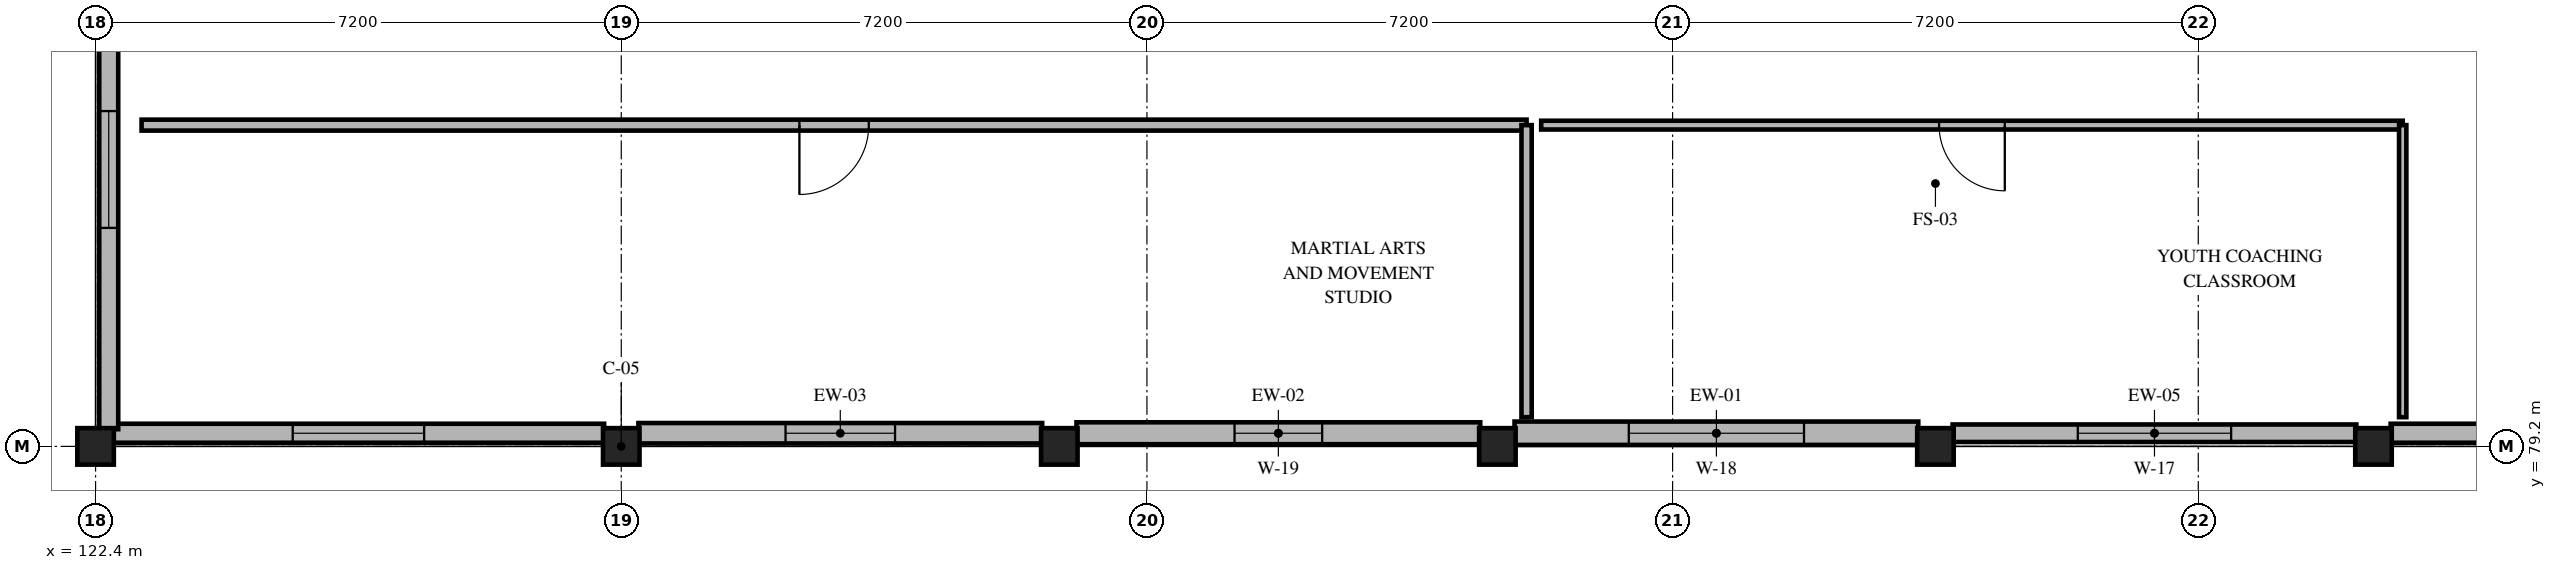
"""IFC4 building model, lengths in metres.
Left out: names, types, materials, properties, quantities, classifications, styles, units other than length and angle.
Written with IfcOpenShell. Run it as: python <this file> out.ifc"""

import sys

from ifc_helpers import new_model, si_unit, direction, frame, frame_2d, origin, origin_2d, place, context, subcontext, project, spatial, rectangle, extrude, element, fill, save


model = new_model("IFC4")
c1 = context("Model", 3, precision=1e-05, world=origin(), true_north=direction((0.0, 1.0)))
c2 = subcontext(c1, "Body", "Model", "MODEL_VIEW")
j1 = project(units=[si_unit("LENGTHUNIT", "METRE"), si_unit("PLANEANGLEUNIT", "RADIAN")], contexts=[c1])
p1 = place(None, origin())
s1 = spatial("IfcSite", under=j1, at=p1, CompositionType="ELEMENT")
p2 = place(p1, origin())
s2 = spatial("IfcBuilding", under=s1, at=p2, CompositionType="ELEMENT")
p3 = place(p2, frame((0.0, 0.0, 8.7)))
s3 = spatial("IfcBuildingStorey", under=s2, at=p3, CompositionType="ELEMENT", Elevation=8.7)
for number, where, z_axis, x_axis in (
    (1, (129.6, 79.2, 0.0), (0.0, 0.0, 1.0), (1.0, 0.0, 0.0)),
    (2, (135.6, 79.2, 0.0), (0.0, 0.0, 1.0), (1.0, 0.0, 0.0)),
    (3, (141.6, 79.2, 0.0), (0.0, 0.0, 1.0), (1.0, 0.0, 0.0)),
    (4, (147.6, 79.2, 0.0), (0.0, 0.0, 1.0), (1.0, 0.0, 0.0)),
    (5, (153.6, 79.2, 0.0), (0.0, 0.0, 1.0), (1.0, 0.0, 0.0)),
    (6, (122.4, 79.2, 0.0), (0.0, 0.0, 1.0), (1.0, 0.0, 0.0)),
):
    element("IfcColumn", number, at=place(p3, frame(where, z_axis=z_axis, x_axis=x_axis)), inside=s3, PredefinedType="COLUMN", context=c2, shape_type="SweptSolid", body=[
        extrude(rectangle(XDim=0.5, YDim=0.5, at=origin_2d()), origin(), (0.0, 0.0, 1.0), 4.2),
    ])
p4 = place(p3, frame((159.365, 79.38, 0.0), z_axis=(0.0, 0.0, 1.0), x_axis=(-1.0, 0.0, 0.0)))
e7 = element("IfcWall", 7, at=p4, inside=s3, PredefinedType="SOLIDWALL", context=c2, shape_type="SweptSolid", body=[
    extrude(rectangle(XDim=5.53, YDim=0.26, at=frame_2d((2.765, 0.0))), origin(), (0.0, 0.0, 1.0), 3.6),
])
p5 = place(p4, frame((1.865, 0.0, 0.75)))
e8 = element("IfcOpeningElement", 8, at=p5, cuts=e7, PredefinedType="OPENING", context=c2, shape_type="SweptSolid", body=[
    extrude(rectangle(XDim=1.8, YDim=1.5, at=frame_2d((0.9, 0.75))), frame((0.0, 0.14, 0.0), z_axis=(0.0, -1.0, 0.0), x_axis=(1.0, 0.0, 0.0)), (0.0, 0.0, 1.0), 0.28),
])
p6 = place(p3, frame((153.365, 79.38, 0.0), z_axis=(0.0, 0.0, 1.0), x_axis=(-1.0, 0.0, 0.0)))
e9 = element("IfcWall", 9, at=p6, inside=s3, PredefinedType="SOLIDWALL", context=c2, shape_type="SweptSolid", body=[
    extrude(rectangle(XDim=5.53, YDim=0.24, at=frame_2d((2.765, 0.0))), origin(), (0.0, 0.0, 1.0), 3.6),
])
p7 = place(p6, frame((1.715, 0.0, 0.75)))
e10 = element("IfcOpeningElement", 10, at=p7, cuts=e9, PredefinedType="OPENING", context=c2, shape_type="SweptSolid", body=[
    extrude(rectangle(XDim=2.1, YDim=1.5, at=frame_2d((1.05, 0.75))), frame((0.0, 0.13, 0.0), z_axis=(0.0, -1.0, 0.0), x_axis=(1.0, 0.0, 0.0)), (0.0, 0.0, 1.0), 0.26),
])
p8 = place(p3, frame((147.365, 79.38, 0.0), z_axis=(0.0, 0.0, 1.0), x_axis=(-1.0, 0.0, 0.0)))
e11 = element("IfcWall", 11, at=p8, inside=s3, PredefinedType="SOLIDWALL", context=c2, shape_type="SweptSolid", body=[
    extrude(rectangle(XDim=5.53, YDim=0.32, at=frame_2d((2.765, 0.0))), origin(), (0.0, 0.0, 1.0), 3.6),
])
p9 = place(p8, frame((1.565, 0.0, 0.75)))
e12 = element("IfcOpeningElement", 12, at=p9, cuts=e11, PredefinedType="OPENING", context=c2, shape_type="SweptSolid", body=[
    extrude(rectangle(XDim=2.4, YDim=1.5, at=frame_2d((1.2, 0.75))), frame((0.0, 0.17, 0.0), z_axis=(0.0, -1.0, 0.0), x_axis=(1.0, 0.0, 0.0)), (0.0, 0.0, 1.0), 0.34),
])
p10 = place(p3, frame((141.365, 79.38, 0.0), z_axis=(0.0, 0.0, 1.0), x_axis=(-1.0, 0.0, 0.0)))
e13 = element("IfcWall", 13, at=p10, inside=s3, PredefinedType="SOLIDWALL", context=c2, shape_type="SweptSolid", body=[
    extrude(rectangle(XDim=5.53, YDim=0.3, at=frame_2d((2.765, 0.0))), origin(), (0.0, 0.0, 1.0), 3.6),
])
p11 = place(p10, frame((2.165, 0.0, 0.75)))
e14 = element("IfcOpeningElement", 14, at=p11, cuts=e13, PredefinedType="OPENING", context=c2, shape_type="SweptSolid", body=[
    extrude(rectangle(XDim=1.2, YDim=1.65, at=frame_2d((0.6, 0.825))), frame((0.0, 0.16, 0.0), z_axis=(0.0, -1.0, 0.0), x_axis=(1.0, 0.0, 0.0)), (0.0, 0.0, 1.0), 0.32),
])
p12 = place(p3, frame((135.365, 79.38, 0.0), z_axis=(0.0, 0.0, 1.0), x_axis=(-1.0, 0.0, 0.0)))
e15 = element("IfcWall", 15, at=p12, inside=s3, PredefinedType="SOLIDWALL", context=c2, shape_type="SweptSolid", body=[
    extrude(rectangle(XDim=5.53, YDim=0.28, at=frame_2d((2.765, 0.0))), origin(), (0.0, 0.0, 1.0), 3.6),
])
p13 = place(p12, frame((2.015, 0.0, 0.75)))
e16 = element("IfcOpeningElement", 16, at=p13, cuts=e15, PredefinedType="OPENING", context=c2, shape_type="SweptSolid", body=[
    extrude(rectangle(XDim=1.5, YDim=1.65, at=frame_2d((0.75, 0.825))), frame((0.0, 0.15, 0.0), z_axis=(0.0, -1.0, 0.0), x_axis=(1.0, 0.0, 0.0)), (0.0, 0.0, 1.0), 0.3),
])
p14 = place(p3, frame((129.365, 79.38, 0.0), z_axis=(0.0, 0.0, 1.0), x_axis=(-1.0, 0.0, 0.0)))
e17 = element("IfcWall", 17, at=p14, inside=s3, PredefinedType="SOLIDWALL", context=c2, shape_type="SweptSolid", body=[
    extrude(rectangle(XDim=6.73, YDim=0.26, at=frame_2d((3.365, 0.0))), origin(), (0.0, 0.0, 1.0), 3.51),
])
p15 = place(p14, frame((2.465, 0.0, 0.75)))
e18 = element("IfcOpeningElement", 18, at=p15, cuts=e17, PredefinedType="OPENING", context=c2, shape_type="SweptSolid", body=[
    extrude(rectangle(XDim=1.8, YDim=1.65, at=frame_2d((0.9, 0.825))), frame((0.0, 0.14, 0.0), z_axis=(0.0, -1.0, 0.0), x_axis=(1.0, 0.0, 0.0)), (0.0, 0.0, 1.0), 0.28),
])
p16 = place(p3, frame((122.58, 79.435, 0.0), z_axis=(0.0, 0.0, 1.0), x_axis=(0.0, 1.0, 0.0)))
e19 = element("IfcWall", 19, at=p16, inside=s3, PredefinedType="SOLIDWALL", context=c2, shape_type="SweptSolid", body=[
    extrude(rectangle(XDim=7.115, YDim=0.26, at=frame_2d((3.558, 0.0))), origin(), (0.0, 0.0, 1.0), 3.96),
])
p17 = place(p16, frame((2.758, 0.0, 0.75)))
e20 = element("IfcOpeningElement", 20, at=p17, cuts=e19, PredefinedType="OPENING", context=c2, shape_type="SweptSolid", body=[
    extrude(rectangle(XDim=1.6, YDim=1.45, at=frame_2d((0.8, 0.725))), frame((0.0, 0.14, 0.0), z_axis=(0.0, -1.0, 0.0), x_axis=(1.0, 0.0, 0.0)), (0.0, 0.0, 1.0), 0.28),
])
p18 = place(p3, frame((142.0, 83.6, 0.0), z_axis=(0.0, 0.0, 1.0), x_axis=(-1.0, 0.0, 0.0)))
e21 = element("IfcWall", 21, at=p18, inside=s3, PredefinedType="PARTITIONING", context=c2, shape_type="SweptSolid", body=[
    extrude(rectangle(XDim=18.97, YDim=0.15, at=frame_2d((9.485, 0.0))), origin(), (0.0, 0.0, 1.0), 3.56),
])
p19 = place(p18, frame((9.01, 0.0, 0.0)))
e22 = element("IfcOpeningElement", 22, at=p19, cuts=e21, PredefinedType="OPENING", context=c2, shape_type="SweptSolid", body=[
    extrude(rectangle(XDim=0.95, YDim=2.15, at=frame_2d((0.475, 1.075))), frame((0.0, 0.085, 0.0), z_axis=(0.0, -1.0, 0.0), x_axis=(1.0, 0.0, 0.0)), (0.0, 0.0, 1.0), 0.17),
])
p20 = place(p3, frame((142.0, 79.6, 0.0), z_axis=(0.0, 0.0, 1.0), x_axis=(0.0, 1.0, 0.0)))
e23 = element("IfcWall", 23, at=p20, inside=s3, PredefinedType="PARTITIONING", context=c2, shape_type="SweptSolid", body=[
    extrude(rectangle(XDim=4.0, YDim=0.14, at=frame_2d((2.0, 0.0))), origin(), (0.0, 0.0, 1.0), 3.63),
])
p21 = place(p3, frame((154.0, 83.6, 0.0), z_axis=(0.0, 0.0, 1.0), x_axis=(-1.0, 0.0, 0.0)))
e24 = element("IfcWall", 24, at=p21, inside=s3, PredefinedType="PARTITIONING", context=c2, shape_type="SweptSolid", body=[
    extrude(rectangle(XDim=11.8, YDim=0.12, at=frame_2d((5.9, 0.0))), origin(), (0.0, 0.0, 1.0), 3.56),
])
p22 = place(p21, frame((5.45, 0.0, 0.0)))
e25 = element("IfcOpeningElement", 25, at=p22, cuts=e24, PredefinedType="OPENING", context=c2, shape_type="SweptSolid", body=[
    extrude(rectangle(XDim=0.9, YDim=2.1, at=frame_2d((0.45, 1.05))), frame((0.0, 0.07, 0.0), z_axis=(0.0, -1.0, 0.0), x_axis=(1.0, 0.0, 0.0)), (0.0, 0.0, 1.0), 0.14),
])
p23 = place(p3, frame((154.0, 79.6, 0.0), z_axis=(0.0, 0.0, 1.0), x_axis=(0.0, 1.0, 0.0)))
e26 = element("IfcWall", 26, at=p23, inside=s3, PredefinedType="PARTITIONING", context=c2, shape_type="SweptSolid", body=[
    extrude(rectangle(XDim=4.0, YDim=0.1, at=frame_2d((2.0, 0.0))), origin(), (0.0, 0.0, 1.0), 3.72),
])
p24 = place(p7, origin())
e27 = element("IfcWindow", 27, at=p24, inside=s3, PartitioningType="SINGLE_PANEL", PredefinedType="WINDOW", context=c2, shape_type="SweptSolid", body=[
    extrude(rectangle(XDim=2.1, YDim=1.5, at=frame_2d((1.05, 0.75))), frame((0.0, 0.03, 0.0), z_axis=(0.0, -1.0, 0.0), x_axis=(1.0, 0.0, 0.0)), (0.0, 0.0, 1.0), 0.06),
])
fill(e10, e27)
p25 = place(p9, origin())
e28 = element("IfcWindow", 28, at=p25, inside=s3, PartitioningType="SINGLE_PANEL", PredefinedType="WINDOW", context=c2, shape_type="SweptSolid", body=[
    extrude(rectangle(XDim=2.4, YDim=1.5, at=frame_2d((1.2, 0.75))), frame((0.0, 0.03, 0.0), z_axis=(0.0, -1.0, 0.0), x_axis=(1.0, 0.0, 0.0)), (0.0, 0.0, 1.0), 0.06),
])
fill(e12, e28)
p26 = place(p11, origin())
e29 = element("IfcWindow", 29, at=p26, inside=s3, PartitioningType="SINGLE_PANEL", PredefinedType="WINDOW", context=c2, shape_type="SweptSolid", body=[
    extrude(rectangle(XDim=1.2, YDim=1.65, at=frame_2d((0.6, 0.825))), frame((0.0, 0.03, 0.0), z_axis=(0.0, -1.0, 0.0), x_axis=(1.0, 0.0, 0.0)), (0.0, 0.0, 1.0), 0.06),
])
fill(e14, e29)
p27 = place(p13, origin())
e30 = element("IfcWindow", 30, at=p27, inside=s3, PartitioningType="SINGLE_PANEL", PredefinedType="WINDOW", context=c2, shape_type="SweptSolid", body=[
    extrude(rectangle(XDim=1.5, YDim=1.65, at=frame_2d((0.75, 0.825))), frame((0.0, 0.03, 0.0), z_axis=(0.0, -1.0, 0.0), x_axis=(1.0, 0.0, 0.0)), (0.0, 0.0, 1.0), 0.06),
])
fill(e16, e30)
p28 = place(p15, origin())
e31 = element("IfcWindow", 31, at=p28, inside=s3, PartitioningType="SINGLE_PANEL", PredefinedType="WINDOW", context=c2, shape_type="SweptSolid", body=[
    extrude(rectangle(XDim=1.8, YDim=1.65, at=frame_2d((0.9, 0.825))), frame((0.0, 0.03, 0.0), z_axis=(0.0, -1.0, 0.0), x_axis=(1.0, 0.0, 0.0)), (0.0, 0.0, 1.0), 0.06),
])
fill(e18, e31)
p29 = place(p17, origin())
e32 = element("IfcWindow", 32, at=p29, inside=s3, PartitioningType="SINGLE_PANEL", PredefinedType="WINDOW", context=c2, shape_type="SweptSolid", body=[
    extrude(rectangle(XDim=1.6, YDim=1.45, at=frame_2d((0.8, 0.725))), frame((0.0, 0.03, 0.0), z_axis=(0.0, -1.0, 0.0), x_axis=(1.0, 0.0, 0.0)), (0.0, 0.0, 1.0), 0.06),
])
fill(e20, e32)
p30 = place(p19, origin())
e33 = element("IfcDoor", 33, at=p30, inside=s3, OperationType="SINGLE_SWING_RIGHT", PredefinedType="DOOR", context=c2, shape_type="SweptSolid", body=[
    extrude(rectangle(XDim=0.95, YDim=2.15, at=frame_2d((0.475, 1.075))), frame((0.0, 0.025, 0.0), z_axis=(0.0, -1.0, 0.0), x_axis=(1.0, 0.0, 0.0)), (0.0, 0.0, 1.0), 0.05),
])
fill(e22, e33)
p31 = place(p22, origin())
e34 = element("IfcDoor", 34, at=p31, inside=s3, OperationType="SINGLE_SWING_LEFT", PredefinedType="DOOR", context=c2, shape_type="SweptSolid", body=[
    extrude(rectangle(XDim=0.9, YDim=2.1, at=frame_2d((0.45, 1.05))), frame((0.0, 0.025, 0.0), z_axis=(0.0, -1.0, 0.0), x_axis=(1.0, 0.0, 0.0)), (0.0, 0.0, 1.0), 0.05),
])
fill(e25, e34)
save(model, sys.argv[1])
